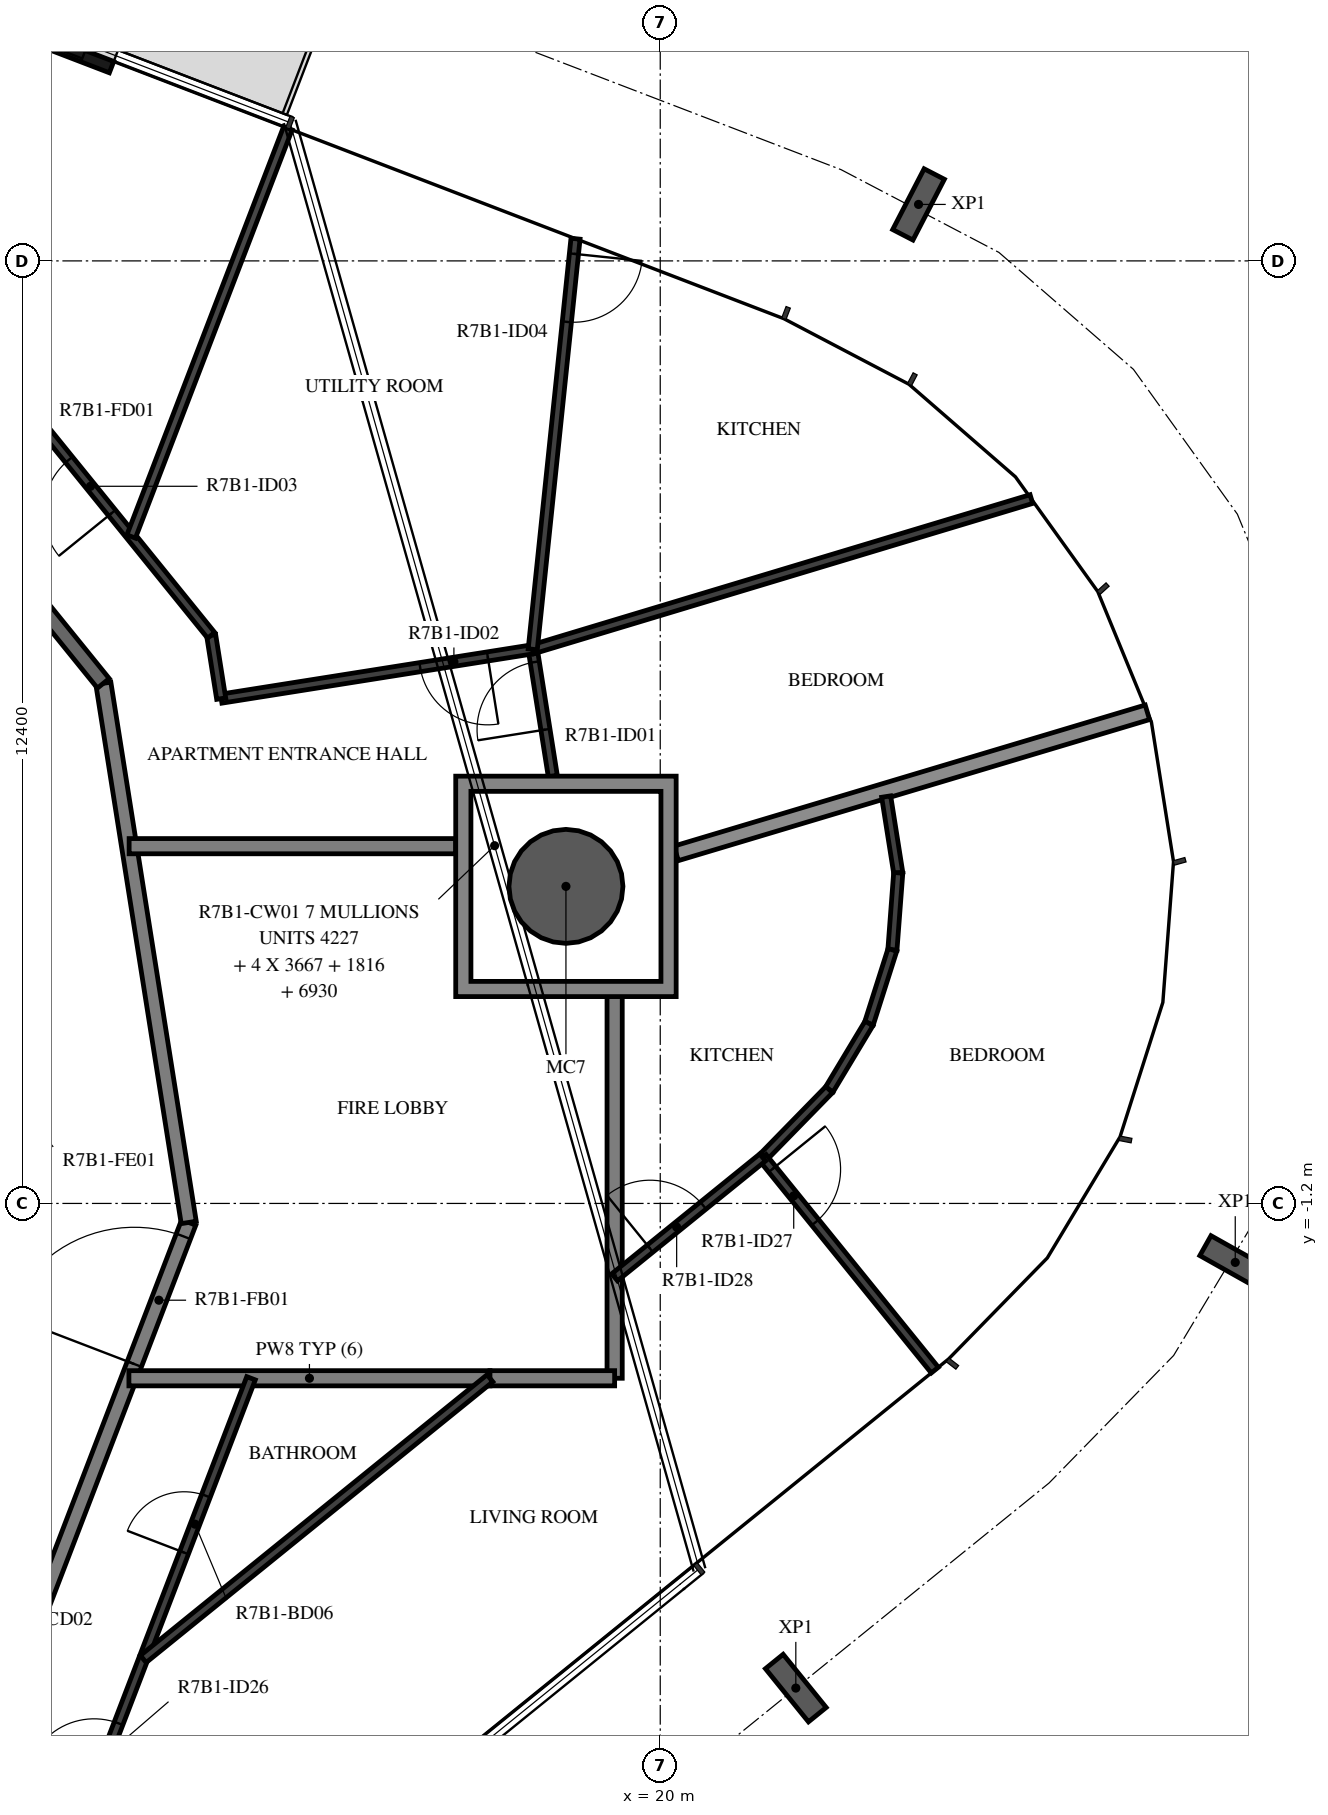
"""IFC4 building model, lengths in metres.
Left out: names, types, materials, properties, quantities, classifications, styles, units other than length and angle.
Written with IfcOpenShell. Run it as: python <this file> out.ifc"""

import sys

from ifc_helpers import new_model, si_unit, direction, frame, frame_2d, origin, origin_2d, place, context, subcontext, project, spatial, polyline, rectangle, hollow_circle, i_section, outline, extrude, element, fill, save


model = new_model("IFC4")
c1 = context("Model", 3, precision=1e-05, world=origin(), true_north=direction((0.0, 1.0)))
c2 = subcontext(c1, "Body", "Model", "MODEL_VIEW")
j1 = project(units=[si_unit("LENGTHUNIT", "METRE"), si_unit("PLANEANGLEUNIT", "RADIAN")], contexts=[c1])
p1 = place(None, origin())
s1 = spatial("IfcSite", under=j1, at=p1, CompositionType="ELEMENT")
p2 = place(p1, origin())
s2 = spatial("IfcBuilding", under=s1, at=p2, CompositionType="ELEMENT")
p3 = place(p2, frame((0.0, 0.0, 273.9)))
s3 = spatial("IfcBuildingStorey", under=s2, at=p3, CompositionType="ELEMENT", Elevation=273.9)
p4 = place(p3, frame((18.76, 2.971, -0.38), z_axis=(0.0, 0.0, 1.0), x_axis=(1.0, 0.0, 0.0)))
e1 = element("IfcColumn", 1, at=p4, inside=s3, PredefinedType="COLUMN", context=c2, shape_type="SweptSolid", body=[
    extrude(hollow_circle(Radius=0.75, WallThickness=0.035, at=origin_2d()), origin(), (0.0, 0.0, 1.0), 3.5),
])
for number, where, z_axis, x_axis in (
    (2, (21.784, -7.576, -0.38), (0.0, 0.0, 1.0), (-0.777, -0.629, 0.0)),
    (3, (27.565, -1.976, -0.38), (0.0, 0.0, 1.0), (-0.49, -0.872, 0.0)),
    (4, (23.398, 11.943, -0.38), (0.0, 0.0, 1.0), (0.888, -0.459, 0.0)),
):
    element("IfcColumn", number, at=place(p3, frame(where, z_axis=z_axis, x_axis=x_axis)), inside=s3, PredefinedType="COLUMN", context=c2, shape_type="SweptSolid", body=[
        extrude(i_section(OverallWidth=0.3, OverallDepth=0.9, WebThickness=0.019, FlangeThickness=0.035, FilletRadius=0.03, at=origin_2d()), origin(), (0.0, 0.0, 1.0), 3.5),
    ])
p5 = place(p3, frame((12.781, 13.75, 0.0), z_axis=(0.0, 0.0, 1.0), x_axis=(-0.933579413923, 0.358370587381, 0.0)))
e5 = element("IfcWall", 5, at=p5, inside=s3, PredefinedType="STANDARD", context=c2, shape_type="SweptSolid", body=[
    extrude(rectangle(XDim=3.2, YDim=0.16, at=frame_2d((1.6, 0.0))), origin(), (0.0, 0.0, 1.0), 3.12),
])
p6 = place(p5, frame((0.4, 0.0, 0.0)))
e6 = element("IfcOpeningElement", 6, at=p6, cuts=e5, PredefinedType="OPENING", context=c2, shape_type="SweptSolid", body=[
    extrude(rectangle(XDim=2.4, YDim=2.4, at=frame_2d((1.2, 1.2))), frame((0.0, 0.09, 0.0), z_axis=(0.0, -1.0, 0.0), x_axis=(1.0, 0.0, 0.0)), (0.0, 0.0, 1.0), 0.18),
])
p7 = place(p3, frame((11.223, -8.154, 0.0), z_axis=(0.0, 0.0, 1.0), x_axis=(0.358341090983, 0.93359073609, 0.0)))
e7 = element("IfcWall", 7, at=p7, inside=s3, PredefinedType="STANDARD", context=c2, shape_type="SweptSolid", body=[
    extrude(rectangle(XDim=7.181, YDim=0.2, at=frame_2d((3.59, 0.0))), origin(), (0.0, 0.0, 1.0), 3.12),
])
p8 = place(p7, frame((5.185, 0.0, 0.0)))
e8 = element("IfcOpeningElement", 8, at=p8, cuts=e7, PredefinedType="OPENING", context=c2, shape_type="SweptSolid", body=[
    extrude(rectangle(XDim=1.8, YDim=2.1, at=frame_2d((0.9, 1.05))), frame((0.0, 0.11, 0.0), z_axis=(0.0, -1.0, 0.0), x_axis=(1.0, 0.0, 0.0)), (0.0, 0.0, 1.0), 0.22),
])
p9 = place(p3, frame((13.797, -1.45, 0.0), z_axis=(0.0, 0.0, 1.0), x_axis=(-0.156421704315, 0.987690361611, 0.0)))
e9 = element("IfcWall", 9, at=p9, inside=s3, PredefinedType="STANDARD", context=c2, shape_type="SweptSolid", body=[
    extrude(rectangle(XDim=7.181, YDim=0.2, at=frame_2d((3.591, 0.0))), origin(), (0.0, 0.0, 1.0), 3.12),
])
p10 = place(p3, frame((12.673, 5.643, 0.0), z_axis=(0.0, 0.0, 1.0), x_axis=(-0.629302871585, 0.777160148113, 0.0)))
e10 = element("IfcWall", 10, at=p10, inside=s3, PredefinedType="STANDARD", context=c2, shape_type="SweptSolid", body=[
    extrude(rectangle(XDim=7.181, YDim=0.2, at=frame_2d((3.59, 0.0))), origin(), (0.0, 0.0, 1.0), 3.12),
])
p11 = place(p10, frame((4.1, 0.0, 0.0)))
e11 = element("IfcOpeningElement", 11, at=p11, cuts=e10, PredefinedType="OPENING", context=c2, shape_type="SweptSolid", body=[
    extrude(rectangle(XDim=1.0, YDim=2.1, at=frame_2d((0.5, 1.05))), frame((0.0, 0.11, 0.0), z_axis=(0.0, -1.0, 0.0), x_axis=(1.0, 0.0, 0.0)), (0.0, 0.0, 1.0), 0.22),
])
p12 = place(p3, frame((17.309, 3.5, 0.0), z_axis=(0.0, 0.0, 1.0), x_axis=(-1.0, 0.0, 0.0)))
e12 = element("IfcWall", 12, at=p12, inside=s3, PredefinedType="STANDARD", context=c2, shape_type="SweptSolid", body=[
    extrude(rectangle(XDim=4.297, YDim=0.2, at=frame_2d((2.148, 0.0))), origin(), (0.0, 0.0, 1.0), 3.12),
])
p13 = place(p3, frame((13.01, -3.5, 0.0), z_axis=(0.0, 0.0, 1.0), x_axis=(1.0, 0.0, 0.0)))
e13 = element("IfcWall", 13, at=p13, inside=s3, PredefinedType="STANDARD", context=c2, shape_type="SweptSolid", body=[
    extrude(rectangle(XDim=4.75, YDim=0.2, at=frame_2d((2.375, 0.0))), origin(), (0.0, 0.0, 1.0), 3.12),
])
p14 = place(p3, frame((19.4, -3.5, 0.0), z_axis=(0.0, 0.0, 1.0), x_axis=(0.0, 1.0, 0.0)))
e14 = element("IfcWall", 14, at=p14, inside=s3, PredefinedType="STANDARD", context=c2, shape_type="SweptSolid", body=[
    extrude(rectangle(XDim=5.021, YDim=0.2, at=frame_2d((2.511, 0.0))), origin(), (0.0, 0.0, 1.0), 3.12),
])
p15 = place(p3, frame((17.76, -3.5, 0.0), z_axis=(0.0, 0.0, 1.0), x_axis=(1.0, 0.0, 0.0)))
e15 = element("IfcWall", 15, at=p15, inside=s3, PredefinedType="STANDARD", context=c2, shape_type="SweptSolid", body=[
    extrude(rectangle(XDim=1.64, YDim=0.2, at=frame_2d((0.82, 0.0))), origin(), (0.0, 0.0, 1.0), 3.12),
])
p16 = place(p3, frame((20.209, 3.405, 0.0), z_axis=(0.0, 0.0, 1.0), x_axis=(0.957991224208, 0.286797514529, 0.0)))
e16 = element("IfcWall", 16, at=p16, inside=s3, PredefinedType="STANDARD", context=c2, shape_type="SweptSolid", body=[
    extrude(rectangle(XDim=6.471, YDim=0.2, at=frame_2d((3.236, 0.0))), origin(), (0.0, 0.0, 1.0), 2.73),
])
p17 = place(p3, frame((18.587, 4.421, 0.0), z_axis=(0.0, 0.0, 1.0), x_axis=(-0.156474488977, 0.987682000595, 0.0)))
e17 = element("IfcWall", 17, at=p17, inside=s3, PredefinedType="PARTITIONING", context=c2, shape_type="SweptSolid", body=[
    extrude(rectangle(XDim=1.69, YDim=0.12, at=frame_2d((0.845, 0.0))), origin(), (0.0, 0.0, 1.0), 3.12),
])
p18 = place(p17, frame((0.62, 0.0, 0.0)))
e18 = element("IfcOpeningElement", 18, at=p18, cuts=e17, PredefinedType="OPENING", context=c2, shape_type="SweptSolid", body=[
    extrude(rectangle(XDim=0.9, YDim=2.1, at=frame_2d((0.45, 1.05))), frame((0.0, 0.07, 0.0), z_axis=(0.0, -1.0, 0.0), x_axis=(1.0, 0.0, 0.0)), (0.0, 0.0, 1.0), 0.14),
])
p19 = place(p3, frame((18.323, 6.09, 0.0), z_axis=(0.0, 0.0, 1.0), x_axis=(-0.987686518745, -0.156445967317, 0.0)))
e19 = element("IfcWall", 19, at=p19, inside=s3, PredefinedType="PARTITIONING", context=c2, shape_type="SweptSolid", body=[
    extrude(rectangle(XDim=4.149, YDim=0.12, at=frame_2d((2.075, 0.0))), origin(), (0.0, 0.0, 1.0), 3.12),
])
p20 = place(p19, frame((0.6, 0.0, 0.0)))
e20 = element("IfcOpeningElement", 20, at=p20, cuts=e19, PredefinedType="OPENING", context=c2, shape_type="SweptSolid", body=[
    extrude(rectangle(XDim=0.9, YDim=2.1, at=frame_2d((0.45, 1.05))), frame((0.0, 0.07, 0.0), z_axis=(0.0, -1.0, 0.0), x_axis=(1.0, 0.0, 0.0)), (0.0, 0.0, 1.0), 0.14),
])
p21 = place(p3, frame((14.224, 5.441, 0.0), z_axis=(0.0, 0.0, 1.0), x_axis=(-0.156556956418, 0.987668932081, 0.0)))
e21 = element("IfcWall", 21, at=p21, inside=s3, PredefinedType="PARTITIONING", context=c2, shape_type="SweptSolid", body=[
    extrude(rectangle(XDim=0.844, YDim=0.12, at=frame_2d((0.422, 0.0))), origin(), (0.0, 0.0, 1.0), 3.12),
])
p22 = place(p3, frame((14.092, 6.274, 0.0), z_axis=(0.0, 0.0, 1.0), x_axis=(-0.62933367237, 0.777135206268, 0.0)))
e22 = element("IfcWall", 22, at=p22, inside=s3, PredefinedType="PARTITIONING", context=c2, shape_type="SweptSolid", body=[
    extrude(rectangle(XDim=7.985, YDim=0.12, at=frame_2d((3.992, 0.0))), origin(), (0.0, 0.0, 1.0), 3.12),
])
p23 = place(p22, frame((2.073, 0.0, 0.0)))
e23 = element("IfcOpeningElement", 23, at=p23, cuts=e22, PredefinedType="OPENING", context=c2, shape_type="SweptSolid", body=[
    extrude(rectangle(XDim=0.9, YDim=2.1, at=frame_2d((0.45, 1.05))), frame((0.0, 0.07, 0.0), z_axis=(0.0, -1.0, 0.0), x_axis=(1.0, 0.0, 0.0)), (0.0, 0.0, 1.0), 0.14),
])
p24 = place(p3, frame((24.883, 8.067, 0.0), z_axis=(0.0, 0.0, 1.0), x_axis=(-0.957485305222, -0.288482044995, 0.0)))
e24 = element("IfcWall", 24, at=p24, inside=s3, PredefinedType="PARTITIONING", context=c2, shape_type="SweptSolid", body=[
    extrude(rectangle(XDim=6.852, YDim=0.12, at=frame_2d((3.426, 0.0))), origin(), (0.0, 0.0, 1.0), 3.12),
])
p25 = place(p3, frame((18.885, 11.492, 0.0), z_axis=(0.0, 0.0, 1.0), x_axis=(-0.10365981832, -0.994612810126, 0.0)))
e25 = element("IfcWall", 25, at=p25, inside=s3, PredefinedType="PARTITIONING", context=c2, shape_type="SweptSolid", body=[
    extrude(rectangle(XDim=5.431, YDim=0.12, at=frame_2d((2.716, 0.0))), origin(), (0.0, 0.0, 1.0), 3.12),
])
p26 = place(p25, frame((0.2, 0.0, 0.0)))
e26 = element("IfcOpeningElement", 26, at=p26, cuts=e25, PredefinedType="OPENING", context=c2, shape_type="SweptSolid", body=[
    extrude(rectangle(XDim=0.9, YDim=2.1, at=frame_2d((0.45, 1.05))), frame((0.0, 0.07, 0.0), z_axis=(0.0, -1.0, 0.0), x_axis=(1.0, 0.0, 0.0)), (0.0, 0.0, 1.0), 0.14),
])
p27 = place(p3, frame((15.101, 12.945, 0.0), z_axis=(0.0, 0.0, 1.0), x_axis=(-0.358373232579, -0.933578398513, 0.0)))
e27 = element("IfcWall", 27, at=p27, inside=s3, PredefinedType="PARTITIONING", context=c2, shape_type="SweptSolid", body=[
    extrude(rectangle(XDim=5.752, YDim=0.12, at=frame_2d((2.876, 0.0))), origin(), (0.0, 0.0, 1.0), 2.73),
])
p28 = place(p3, frame((12.479, -9.067, 0.0), z_axis=(0.0, 0.0, 1.0), x_axis=(0.358372669661, 0.933578614601, 0.0)))
e28 = element("IfcWall", 28, at=p28, inside=s3, PredefinedType="PARTITIONING", context=c2, shape_type="SweptSolid", body=[
    extrude(rectangle(XDim=5.963, YDim=0.12, at=frame_2d((2.981, 0.0))), origin(), (0.0, 0.0, 1.0), 3.12),
])
p29 = place(p28, frame((0.2, 0.0, 0.0)))
e29 = element("IfcOpeningElement", 29, at=p29, cuts=e28, PredefinedType="OPENING", context=c2, shape_type="SweptSolid", body=[
    extrude(rectangle(XDim=0.9, YDim=2.1, at=frame_2d((0.45, 1.05))), frame((0.0, 0.07, 0.0), z_axis=(0.0, -1.0, 0.0), x_axis=(1.0, 0.0, 0.0)), (0.0, 0.0, 1.0), 0.14),
])
p30 = place(p28, frame((3.507, 0.0, 0.0)))
e30 = element("IfcOpeningElement", 30, at=p30, cuts=e28, PredefinedType="OPENING", context=c2, shape_type="SweptSolid", body=[
    extrude(rectangle(XDim=0.8, YDim=2.1, at=frame_2d((0.4, 1.05))), frame((0.0, 0.07, 0.0), z_axis=(0.0, -1.0, 0.0), x_axis=(1.0, 0.0, 0.0)), (0.0, 0.0, 1.0), 0.14),
])
p31 = place(p3, frame((22.972, 4.153, 0.0), z_axis=(0.0, 0.0, 1.0), x_axis=(0.156209385929, -0.987723963336, 0.0)))
e31 = element("IfcWall", 31, at=p31, inside=s3, PredefinedType="PARTITIONING", context=c2, shape_type="SweptSolid", body=[
    extrude(rectangle(XDim=1.016, YDim=0.12, at=frame_2d((0.508, 0.0))), origin(), (0.0, 0.0, 1.0), 3.12),
])
p32 = place(p3, frame((23.131, 3.149, 0.0), z_axis=(0.0, 0.0, 1.0), x_axis=(-0.075446997935, -0.99714981347, 0.0)))
e32 = element("IfcWall", 32, at=p32, inside=s3, PredefinedType="PARTITIONING", context=c2, shape_type="SweptSolid", body=[
    extrude(rectangle(XDim=1.016, YDim=0.12, at=frame_2d((0.508, 0.0))), origin(), (0.0, 0.0, 1.0), 3.12),
])
p33 = place(p3, frame((23.054, 2.136, 0.0), z_axis=(0.0, 0.0, 1.0), x_axis=(-0.303511129679, -0.952827893253, 0.0)))
e33 = element("IfcWall", 33, at=p33, inside=s3, PredefinedType="PARTITIONING", context=c2, shape_type="SweptSolid", body=[
    extrude(rectangle(XDim=1.016, YDim=0.12, at=frame_2d((0.508, 0.0))), origin(), (0.0, 0.0, 1.0), 3.12),
])
p34 = place(p3, frame((22.746, 1.168, 0.0), z_axis=(0.0, 0.0, 1.0), x_axis=(-0.515096534995, -0.857132171626, 0.0)))
e34 = element("IfcWall", 34, at=p34, inside=s3, PredefinedType="PARTITIONING", context=c2, shape_type="SweptSolid", body=[
    extrude(rectangle(XDim=1.016, YDim=0.12, at=frame_2d((0.508, 0.0))), origin(), (0.0, 0.0, 1.0), 3.12),
])
p35 = place(p3, frame((22.223, 0.298, 0.0), z_axis=(0.0, 0.0, 1.0), x_axis=(-0.69880109182, -0.715316037896, 0.0)))
e35 = element("IfcWall", 35, at=p35, inside=s3, PredefinedType="PARTITIONING", context=c2, shape_type="SweptSolid", body=[
    extrude(rectangle(XDim=1.227, YDim=0.12, at=frame_2d((0.614, 0.0))), origin(), (0.0, 0.0, 1.0), 3.12),
])
p36 = place(p3, frame((21.347, -0.595, 0.0), z_axis=(0.0, 0.0, 1.0), x_axis=(0.62934843781, -0.7771232488, 0.0)))
e36 = element("IfcWall", 36, at=p36, inside=s3, PredefinedType="PARTITIONING", context=c2, shape_type="SweptSolid", body=[
    extrude(rectangle(XDim=3.6, YDim=0.12, at=frame_2d((1.8, 0.0))), origin(), (0.0, 0.0, 1.0), 3.12),
])
p37 = place(p36, frame((0.2, 0.0, 0.0)))
e37 = element("IfcOpeningElement", 37, at=p37, cuts=e36, PredefinedType="OPENING", context=c2, shape_type="SweptSolid", body=[
    extrude(rectangle(XDim=0.9, YDim=2.1, at=frame_2d((0.45, 1.05))), frame((0.0, 0.07, 0.0), z_axis=(0.0, -1.0, 0.0), x_axis=(1.0, 0.0, 0.0)), (0.0, 0.0, 1.0), 0.14),
])
p38 = place(p3, frame((19.4, -2.172, 0.0), z_axis=(0.0, 0.0, 1.0), x_axis=(0.777147279935, 0.629318762862, 0.0)))
e38 = element("IfcWall", 38, at=p38, inside=s3, PredefinedType="PARTITIONING", context=c2, shape_type="SweptSolid", body=[
    extrude(rectangle(XDim=2.505, YDim=0.12, at=frame_2d((1.253, 0.0))), origin(), (0.0, 0.0, 1.0), 3.12),
])
p39 = place(p38, frame((0.6, 0.0, 0.0)))
e39 = element("IfcOpeningElement", 39, at=p39, cuts=e38, PredefinedType="OPENING", context=c2, shape_type="SweptSolid", body=[
    extrude(rectangle(XDim=0.9, YDim=2.1, at=frame_2d((0.45, 1.05))), frame((0.0, 0.07, 0.0), z_axis=(0.0, -1.0, 0.0), x_axis=(1.0, 0.0, 0.0)), (0.0, 0.0, 1.0), 0.14),
])
p40 = place(p3, frame((17.76, -3.5, 0.0), z_axis=(0.0, 0.0, 1.0), x_axis=(-0.777133455716, -0.62933583404, 0.0)))
e40 = element("IfcWall", 40, at=p40, inside=s3, PredefinedType="PARTITIONING", context=c2, shape_type="SweptSolid", body=[
    extrude(rectangle(XDim=5.869, YDim=0.12, at=frame_2d((2.935, 0.0))), origin(), (0.0, 0.0, 1.0), 3.12),
])
p41 = place(p3, origin())
e41 = element("IfcWall", 41, at=p41, inside=s3, PredefinedType="STANDARD", context=c2, shape_type="SweptSolid", body=[
    extrude(outline(polyline([(20.209, 4.421), (20.209, 1.521), (17.309, 1.521), (17.309, 4.421), (20.209, 4.421)]), holes=[polyline([(17.51, 1.721), (20.01, 1.721), (20.01, 4.221), (17.51, 4.221), (17.51, 1.721)])]), origin(), (0.0, 0.0, 1.0), 3.12),
])
p42 = place(p6, origin())
e42 = element("IfcDoor", 42, at=p42, inside=s3, OperationType="DOUBLE_DOOR_SLIDING", PredefinedType="DOOR", context=c2, shape_type="SweptSolid", body=[
    extrude(rectangle(XDim=2.4, YDim=2.4, at=frame_2d((1.2, 1.2))), frame((0.0, 0.025, 0.0), z_axis=(0.0, -1.0, 0.0), x_axis=(1.0, 0.0, 0.0)), (0.0, 0.0, 1.0), 0.05),
])
fill(e6, e42)
p43 = place(p18, origin())
e43 = element("IfcDoor", 43, at=p43, inside=s3, OperationType="SINGLE_SWING_LEFT", PredefinedType="DOOR", context=c2, shape_type="SweptSolid", body=[
    extrude(rectangle(XDim=0.9, YDim=2.1, at=frame_2d((0.45, 1.05))), frame((0.0, 0.025, 0.0), z_axis=(0.0, -1.0, 0.0), x_axis=(1.0, 0.0, 0.0)), (0.0, 0.0, 1.0), 0.05),
])
fill(e18, e43)
p44 = place(p20, origin())
e44 = element("IfcDoor", 44, at=p44, inside=s3, OperationType="SINGLE_SWING_RIGHT", PredefinedType="DOOR", context=c2, shape_type="SweptSolid", body=[
    extrude(rectangle(XDim=0.9, YDim=2.1, at=frame_2d((0.45, 1.05))), frame((0.0, 0.025, 0.0), z_axis=(0.0, -1.0, 0.0), x_axis=(1.0, 0.0, 0.0)), (0.0, 0.0, 1.0), 0.05),
])
fill(e20, e44)
p45 = place(p23, origin())
e45 = element("IfcDoor", 45, at=p45, inside=s3, OperationType="SINGLE_SWING_LEFT", PredefinedType="DOOR", context=c2, shape_type="SweptSolid", body=[
    extrude(rectangle(XDim=0.9, YDim=2.1, at=frame_2d((0.45, 1.05))), frame((0.0, 0.025, 0.0), z_axis=(0.0, -1.0, 0.0), x_axis=(1.0, 0.0, 0.0)), (0.0, 0.0, 1.0), 0.05),
])
fill(e23, e45)
p46 = place(p26, origin())
e46 = element("IfcDoor", 46, at=p46, inside=s3, OperationType="SINGLE_SWING_LEFT", PredefinedType="DOOR", context=c2, shape_type="SweptSolid", body=[
    extrude(rectangle(XDim=0.9, YDim=2.1, at=frame_2d((0.45, 1.05))), frame((0.0, 0.025, 0.0), z_axis=(0.0, -1.0, 0.0), x_axis=(1.0, 0.0, 0.0)), (0.0, 0.0, 1.0), 0.05),
])
fill(e26, e46)
p47 = place(p29, origin())
e47 = element("IfcDoor", 47, at=p47, inside=s3, OperationType="SINGLE_SWING_RIGHT", PredefinedType="DOOR", context=c2, shape_type="SweptSolid", body=[
    extrude(rectangle(XDim=0.9, YDim=2.1, at=frame_2d((0.45, 1.05))), frame((0.0, 0.025, 0.0), z_axis=(0.0, -1.0, 0.0), x_axis=(1.0, 0.0, 0.0)), (0.0, 0.0, 1.0), 0.05),
])
fill(e29, e47)
p48 = place(p30, origin())
e48 = element("IfcDoor", 48, at=p48, inside=s3, OperationType="SINGLE_SWING_RIGHT", PredefinedType="DOOR", context=c2, shape_type="SweptSolid", body=[
    extrude(rectangle(XDim=0.8, YDim=2.1, at=frame_2d((0.4, 1.05))), frame((0.0, 0.025, 0.0), z_axis=(0.0, -1.0, 0.0), x_axis=(1.0, 0.0, 0.0)), (0.0, 0.0, 1.0), 0.05),
])
fill(e30, e48)
p49 = place(p37, origin())
e49 = element("IfcDoor", 49, at=p49, inside=s3, OperationType="SINGLE_SWING_RIGHT", PredefinedType="DOOR", context=c2, shape_type="SweptSolid", body=[
    extrude(rectangle(XDim=0.9, YDim=2.1, at=frame_2d((0.45, 1.05))), frame((0.0, 0.025, 0.0), z_axis=(0.0, -1.0, 0.0), x_axis=(1.0, 0.0, 0.0)), (0.0, 0.0, 1.0), 0.05),
])
fill(e37, e49)
p50 = place(p39, origin())
e50 = element("IfcDoor", 50, at=p50, inside=s3, OperationType="SINGLE_SWING_LEFT", PredefinedType="DOOR", context=c2, shape_type="SweptSolid", body=[
    extrude(rectangle(XDim=0.9, YDim=2.1, at=frame_2d((0.45, 1.05))), frame((0.0, 0.025, 0.0), z_axis=(0.0, -1.0, 0.0), x_axis=(1.0, 0.0, 0.0)), (0.0, 0.0, 1.0), 0.05),
])
fill(e39, e50)
p51 = place(p8, origin())
e51 = element("IfcDoor", 51, at=p51, inside=s3, OperationType="DOUBLE_DOOR_SINGLE_SWING", PredefinedType="DOOR", context=c2, shape_type="SweptSolid", body=[
    extrude(rectangle(XDim=1.8, YDim=2.1, at=frame_2d((0.9, 1.05))), frame((0.0, 0.025, 0.0), z_axis=(0.0, -1.0, 0.0), x_axis=(1.0, 0.0, 0.0)), (0.0, 0.0, 1.0), 0.05),
])
fill(e8, e51)
save(model, sys.argv[1])
